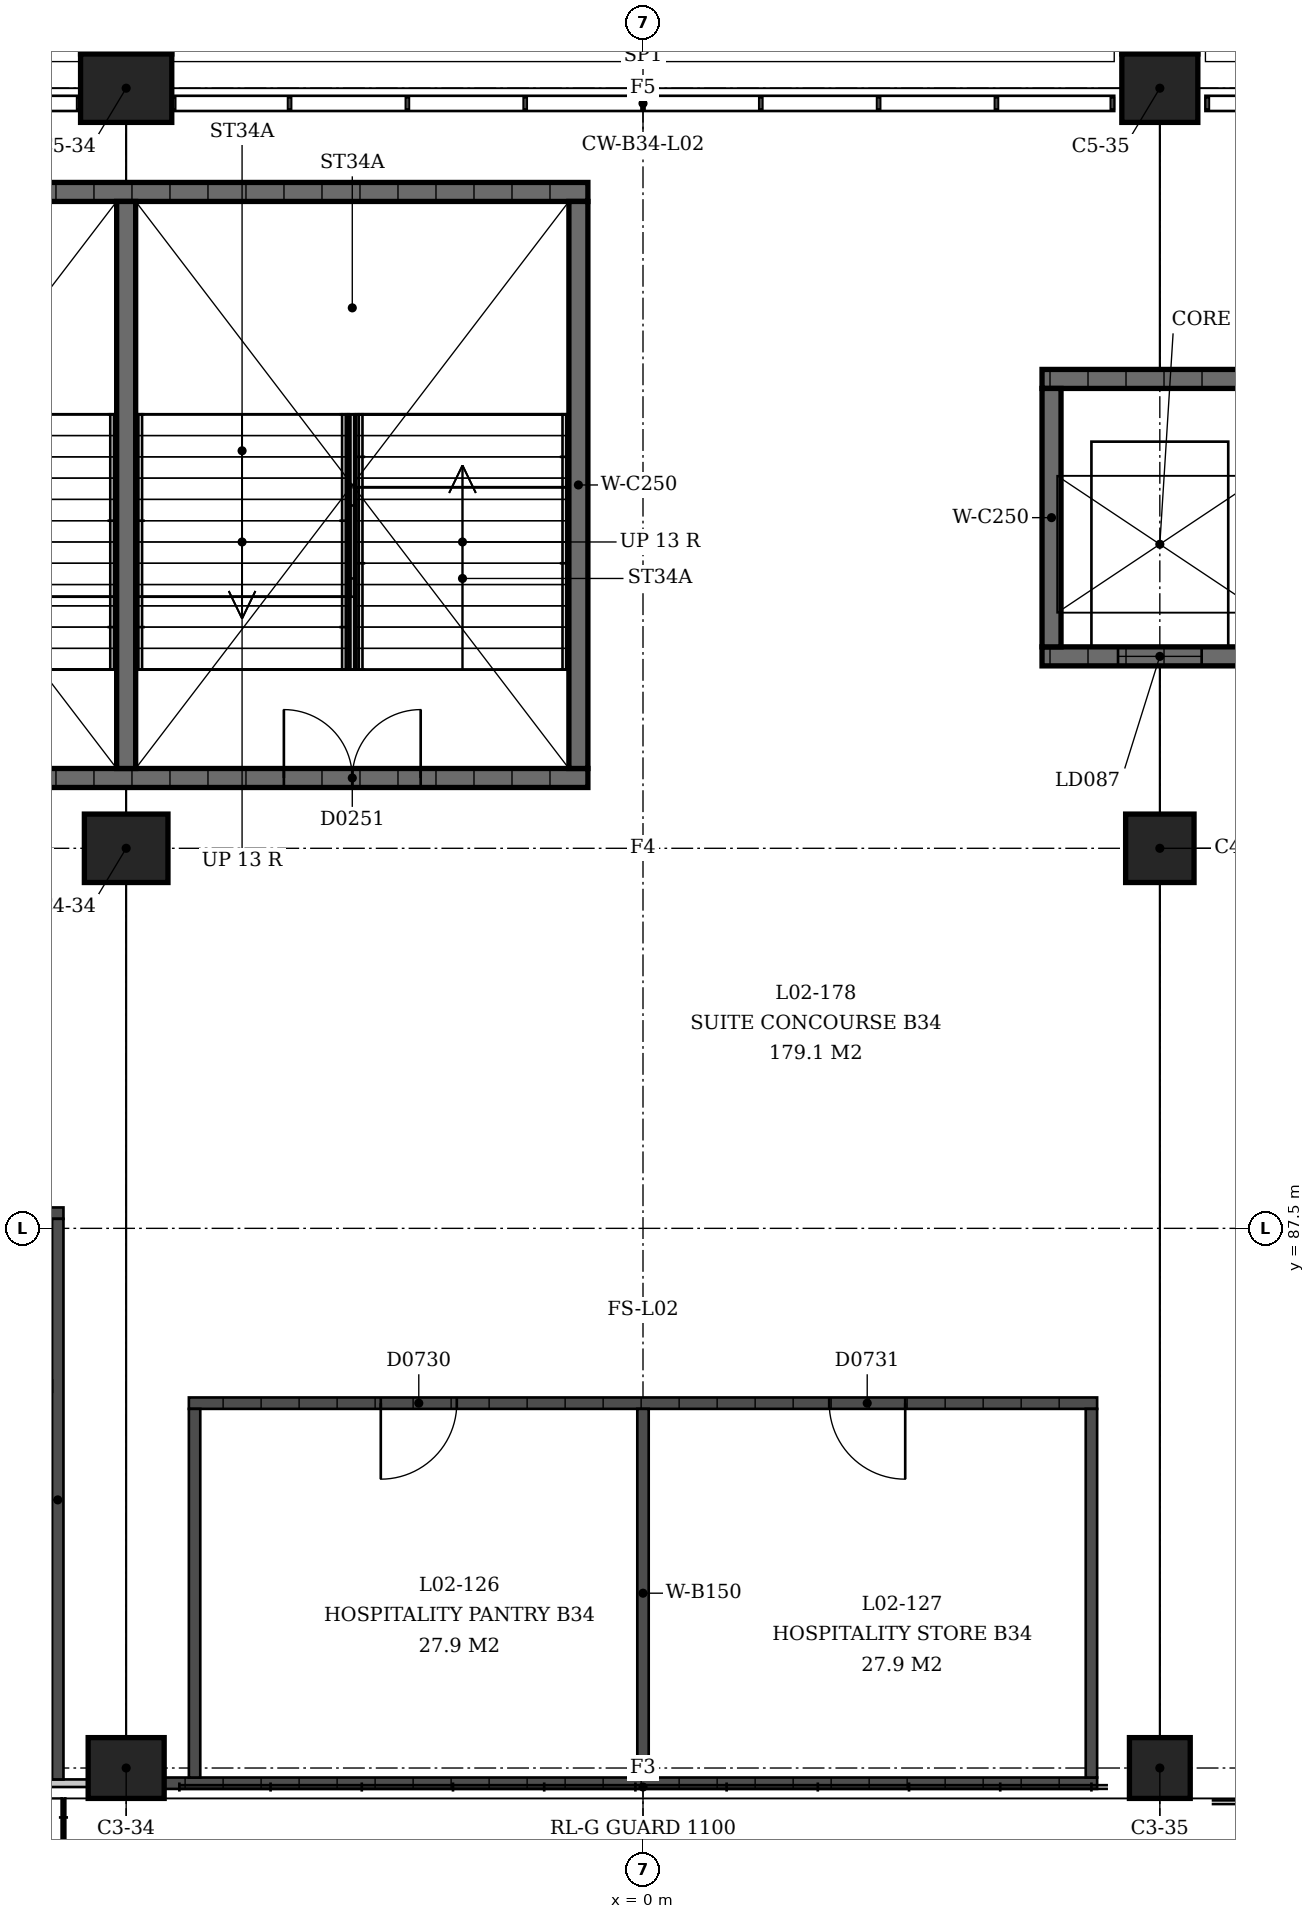
"""IFC4 building model, lengths in metres.
Left out: names, types, materials, properties, quantities, classifications, styles, units other than length and angle.
Written with IfcOpenShell. Run it as: python <this file> out.ifc"""

import sys

from ifc_helpers import new_model, si_unit, direction, frame, frame_2d, origin, origin_2d, place, context, subcontext, project, spatial, rectangle, extrude, element, fill, save


model = new_model("IFC4")
c1 = context("Model", 3, precision=1e-05, world=origin(), true_north=direction((0.0, 1.0)))
c2 = subcontext(c1, "Body", "Model", "MODEL_VIEW")
j1 = project(units=[si_unit("LENGTHUNIT", "METRE"), si_unit("PLANEANGLEUNIT", "RADIAN")], contexts=[c1])
p1 = place(None, origin())
s1 = spatial("IfcSite", under=j1, at=p1, CompositionType="ELEMENT")
p2 = place(p1, origin())
s2 = spatial("IfcBuilding", under=s1, at=p2, CompositionType="ELEMENT")
p3 = place(p2, frame((0.0, 0.0, 9.0)))
s3 = spatial("IfcBuildingStorey", under=s2, at=p3, CompositionType="ELEMENT", Elevation=9.0)
p4 = place(p3, frame((-6.8, 80.4, 0.0), z_axis=(0.0, 0.0, 1.0), x_axis=(-1.0, 0.0, 0.0)))
e1 = element("IfcColumn", 1, at=p4, inside=s3, PredefinedType="COLUMN", context=c2, shape_type="SweptSolid", body=[
    extrude(rectangle(XDim=1.0, YDim=0.8, at=origin_2d()), origin(), (0.0, 0.0, 1.0), 4.5),
])
p5 = place(p3, frame((-6.8, 92.5, 0.0), z_axis=(0.0, 0.0, 1.0), x_axis=(-1.0, 0.0, 0.0)))
e2 = element("IfcColumn", 2, at=p5, inside=s3, PredefinedType="COLUMN", context=c2, shape_type="SweptSolid", body=[
    extrude(rectangle(XDim=1.1, YDim=0.9, at=origin_2d()), origin(), (0.0, 0.0, 1.0), 4.5),
])
p6 = place(p3, frame((-6.8, 102.5, 0.0), z_axis=(0.0, 0.0, 1.0), x_axis=(-1.0, 0.0, 0.0)))
e3 = element("IfcColumn", 3, at=p6, inside=s3, PredefinedType="COLUMN", context=c2, shape_type="SweptSolid", body=[
    extrude(rectangle(XDim=1.2, YDim=0.9, at=origin_2d()), origin(), (0.0, 0.0, 1.0), 4.5),
])
p7 = place(p3, frame((6.8, 80.4, 0.0), z_axis=(0.0, 0.0, 1.0), x_axis=(-1.0, 0.0, 0.0)))
e4 = element("IfcColumn", 4, at=p7, inside=s3, PredefinedType="COLUMN", context=c2, shape_type="SweptSolid", body=[
    extrude(rectangle(XDim=0.8, YDim=0.8, at=origin_2d()), origin(), (0.0, 0.0, 1.0), 4.5),
])
p8 = place(p3, frame((6.8, 92.5, 0.0), z_axis=(0.0, 0.0, 1.0), x_axis=(-1.0, 0.0, 0.0)))
e5 = element("IfcColumn", 5, at=p8, inside=s3, PredefinedType="COLUMN", context=c2, shape_type="SweptSolid", body=[
    extrude(rectangle(XDim=0.9, YDim=0.9, at=origin_2d()), origin(), (0.0, 0.0, 1.0), 4.5),
])
p9 = place(p3, frame((6.8, 102.5, 0.0), z_axis=(0.0, 0.0, 1.0), x_axis=(-1.0, 0.0, 0.0)))
e6 = element("IfcColumn", 6, at=p9, inside=s3, PredefinedType="COLUMN", context=c2, shape_type="SweptSolid", body=[
    extrude(rectangle(XDim=1.0, YDim=0.9, at=origin_2d()), origin(), (0.0, 0.0, 1.0), 4.5),
])
p10 = place(p3, frame((-0.725, 93.425, 0.0), z_axis=(0.0, 0.0, 1.0), x_axis=(-1.0, 0.0, 0.0)))
e7 = element("IfcWall", 7, at=p10, inside=s3, PredefinedType="SHEAR", context=c2, shape_type="SweptSolid", body=[
    extrude(rectangle(XDim=12.15, YDim=0.25, at=frame_2d((6.075, 0.0))), origin(), (0.0, 0.0, 1.0), 4.09),
])
p11 = place(p10, frame((2.2, 0.0, 0.0)))
e8 = element("IfcOpeningElement", 8, at=p11, cuts=e7, PredefinedType="OPENING", context=c2, shape_type="SweptSolid", body=[
    extrude(rectangle(XDim=1.8, YDim=2.1, at=frame_2d((0.9, 1.05))), frame((0.0, 0.125, 0.0), z_axis=(0.0, -1.0, 0.0), x_axis=(1.0, 0.0, 0.0)), (0.0, 0.0, 1.0), 0.25),
])
p12 = place(p10, frame((8.15, 0.0, 0.0)))
e9 = element("IfcOpeningElement", 9, at=p12, cuts=e7, PredefinedType="OPENING", context=c2, shape_type="SweptSolid", body=[
    extrude(rectangle(XDim=1.8, YDim=2.1, at=frame_2d((0.9, 1.05))), frame((0.0, 0.125, 0.0), z_axis=(0.0, -1.0, 0.0), x_axis=(1.0, 0.0, 0.0)), (0.0, 0.0, 1.0), 0.25),
])
p13 = place(p3, frame((-0.725, 101.135, 0.0), z_axis=(0.0, 0.0, 1.0), x_axis=(-1.0, 0.0, 0.0)))
e10 = element("IfcWall", 10, at=p13, inside=s3, PredefinedType="SHEAR", context=c2, shape_type="SweptSolid", body=[
    extrude(rectangle(XDim=12.15, YDim=0.25, at=frame_2d((6.075, 0.0))), origin(), (0.0, 0.0, 1.0), 4.09),
])
for number, where, z_axis, x_axis in (
    (11, (-0.85, 93.55, 0.0), (0.0, 0.0, 1.0), (0.0, 1.0, 0.0)),
    (12, (-6.8, 93.55, 0.0), (0.0, 0.0, 1.0), (0.0, 1.0, 0.0)),
):
    element("IfcWall", number, at=place(p3, frame(where, z_axis=z_axis, x_axis=x_axis)), inside=s3, PredefinedType="SHEAR", context=c2, shape_type="SweptSolid", body=[
        extrude(rectangle(XDim=7.46, YDim=0.25, at=frame_2d((3.73, 0.0))), origin(), (0.0, 0.0, 1.0), 4.09),
    ])
p14 = place(p3, frame((8.35, 95.025, 0.0), z_axis=(0.0, 0.0, 1.0), x_axis=(-1.0, 0.0, 0.0)))
e13 = element("IfcWall", 13, at=p14, inside=s3, PredefinedType="SHEAR", context=c2, shape_type="SweptSolid", body=[
    extrude(rectangle(XDim=3.1, YDim=0.25, at=frame_2d((1.55, 0.0))), origin(), (0.0, 0.0, 1.0), 4.09),
])
p15 = place(p14, frame((1.0, 0.0, 0.0)))
e14 = element("IfcOpeningElement", 14, at=p15, cuts=e13, PredefinedType="OPENING", context=c2, shape_type="SweptSolid", body=[
    extrude(rectangle(XDim=1.1, YDim=2.1, at=frame_2d((0.55, 1.05))), frame((0.0, 0.125, 0.0), z_axis=(0.0, -1.0, 0.0), x_axis=(1.0, 0.0, 0.0)), (0.0, 0.0, 1.0), 0.25),
])
p16 = place(p3, frame((8.35, 98.675, 0.0), z_axis=(0.0, 0.0, 1.0), x_axis=(-1.0, 0.0, 0.0)))
e15 = element("IfcWall", 15, at=p16, inside=s3, PredefinedType="SHEAR", context=c2, shape_type="SweptSolid", body=[
    extrude(rectangle(XDim=3.1, YDim=0.25, at=frame_2d((1.55, 0.0))), origin(), (0.0, 0.0, 1.0), 4.09),
])
p17 = place(p3, frame((5.375, 95.15, 0.0), z_axis=(0.0, 0.0, 1.0), x_axis=(0.0, 1.0, 0.0)))
e16 = element("IfcWall", 16, at=p17, inside=s3, PredefinedType="SHEAR", context=c2, shape_type="SweptSolid", body=[
    extrude(rectangle(XDim=3.4, YDim=0.25, at=frame_2d((1.7, 0.0))), origin(), (0.0, 0.0, 1.0), 4.09),
])
p18 = place(p3, frame((-7.3, 80.2, 0.0), z_axis=(0.0, 0.0, 1.0), x_axis=(-1.0, 0.0, 0.0)))
e17 = element("IfcWall", 17, at=p18, inside=s3, PredefinedType="PARTITIONING", context=c2, shape_type="SweptSolid", body=[
    extrude(rectangle(XDim=6.475, YDim=0.1, at=frame_2d((3.237, 0.0))), origin(), (0.0, 0.0, 1.0), 3.0),
])
p19 = place(p18, frame((2.5, 0.0, 0.0)))
e18 = element("IfcOpeningElement", 18, at=p19, cuts=e17, PredefinedType="OPENING", context=c2, shape_type="SweptSolid", body=[
    extrude(rectangle(XDim=1.8, YDim=2.1, at=frame_2d((0.9, 1.05))), frame((0.0, 0.05, 0.0), z_axis=(0.0, -1.0, 0.0), x_axis=(1.0, 0.0, 0.0)), (0.0, 0.0, 1.0), 0.1),
])
p20 = place(p3, frame((-7.625, 87.7, 0.0), z_axis=(0.0, 0.0, 1.0), x_axis=(-1.0, 0.0, 0.0)))
e19 = element("IfcWall", 19, at=p20, inside=s3, PredefinedType="SOLIDWALL", context=c2, shape_type="SweptSolid", body=[
    extrude(rectangle(XDim=6.15, YDim=0.15, at=frame_2d((3.075, 0.0))), origin(), (0.0, 0.0, 1.0), 3.0),
])
p21 = place(p20, frame((3.862, 0.0, 0.0)))
e20 = element("IfcOpeningElement", 20, at=p21, cuts=e19, PredefinedType="OPENING", context=c2, shape_type="SweptSolid", body=[
    extrude(rectangle(XDim=1.0, YDim=2.1, at=frame_2d((0.5, 1.05))), frame((0.0, 0.075, 0.0), z_axis=(0.0, -1.0, 0.0), x_axis=(1.0, 0.0, 0.0)), (0.0, 0.0, 1.0), 0.15),
])
p22 = place(p3, frame((-7.7, 80.25, 0.0), z_axis=(0.0, 0.0, 1.0), x_axis=(0.0, 1.0, 0.0)))
e21 = element("IfcWall", 21, at=p22, inside=s3, PredefinedType="SOLIDWALL", context=c2, shape_type="SweptSolid", body=[
    extrude(rectangle(XDim=7.375, YDim=0.15, at=frame_2d((3.688, 0.0))), origin(), (0.0, 0.0, 1.0), 3.0),
])
p23 = place(p3, frame((-7.775, 85.425, 0.0), z_axis=(0.0, 0.0, 1.0), x_axis=(-1.0, 0.0, 0.0)))
e22 = element("IfcWall", 22, at=p23, inside=s3, PredefinedType="PARTITIONING", context=c2, shape_type="SweptSolid", body=[
    extrude(rectangle(XDim=1.775, YDim=0.15, at=frame_2d((0.888, 0.0))), origin(), (0.0, 0.0, 1.0), 3.0),
])
p24 = place(p23, frame((0.363, 0.0, 0.0)))
e23 = element("IfcOpeningElement", 23, at=p24, cuts=e22, PredefinedType="OPENING", context=c2, shape_type="SweptSolid", body=[
    extrude(rectangle(XDim=0.9, YDim=2.1, at=frame_2d((0.45, 1.05))), frame((0.0, 0.075, 0.0), z_axis=(0.0, -1.0, 0.0), x_axis=(1.0, 0.0, 0.0)), (0.0, 0.0, 1.0), 0.15),
])
p25 = place(p3, frame((-6.3, 80.2, 0.0), z_axis=(0.0, 0.0, 1.0), x_axis=(1.0, 0.0, 0.0)))
e24 = element("IfcWall", 24, at=p25, inside=s3, PredefinedType="SOLIDWALL", context=c2, shape_type="SweptSolid", body=[
    extrude(rectangle(XDim=12.275, YDim=0.15, at=frame_2d((6.138, 0.0))), origin(), (0.0, 0.0, 1.0), 3.0),
])
p26 = place(p3, frame((-5.975, 85.2, 0.0), z_axis=(0.0, 0.0, 1.0), x_axis=(1.0, 0.0, 0.0)))
e25 = element("IfcWall", 25, at=p26, inside=s3, PredefinedType="SOLIDWALL", context=c2, shape_type="SweptSolid", body=[
    extrude(rectangle(XDim=11.95, YDim=0.15, at=frame_2d((5.975, 0.0))), origin(), (0.0, 0.0, 1.0), 3.0),
])
p27 = place(p26, frame((2.525, 0.0, 0.0)))
e26 = element("IfcOpeningElement", 26, at=p27, cuts=e25, PredefinedType="OPENING", context=c2, shape_type="SweptSolid", body=[
    extrude(rectangle(XDim=1.0, YDim=2.1, at=frame_2d((0.5, 1.05))), frame((0.0, 0.075, 0.0), z_axis=(0.0, -1.0, 0.0), x_axis=(1.0, 0.0, 0.0)), (0.0, 0.0, 1.0), 0.15),
])
p28 = place(p26, frame((8.425, 0.0, 0.0)))
e27 = element("IfcOpeningElement", 27, at=p28, cuts=e25, PredefinedType="OPENING", context=c2, shape_type="SweptSolid", body=[
    extrude(rectangle(XDim=1.0, YDim=2.1, at=frame_2d((0.5, 1.05))), frame((0.0, 0.075, 0.0), z_axis=(0.0, -1.0, 0.0), x_axis=(1.0, 0.0, 0.0)), (0.0, 0.0, 1.0), 0.15),
])
for number, where, z_axis, x_axis in (
    (28, (-5.9, 80.275, 0.0), (0.0, 0.0, 1.0), (0.0, 1.0, 0.0)),
    (29, (0.0, 80.275, 0.0), (0.0, 0.0, 1.0), (0.0, 1.0, 0.0)),
    (30, (5.9, 80.275, 0.0), (0.0, 0.0, 1.0), (0.0, 1.0, 0.0)),
):
    element("IfcWall", number, at=place(p3, frame(where, z_axis=z_axis, x_axis=x_axis)), inside=s3, PredefinedType="SOLIDWALL", context=c2, shape_type="SweptSolid", body=[
        extrude(rectangle(XDim=4.85, YDim=0.15, at=frame_2d((2.425, 0.0))), origin(), (0.0, 0.0, 1.0), 3.0),
    ])
p29 = place(p11, origin())
e31 = element("IfcDoor", 31, at=p29, inside=s3, OperationType="DOUBLE_DOOR_SINGLE_SWING", PredefinedType="DOOR", context=c2, shape_type="SweptSolid", body=[
    extrude(rectangle(XDim=1.8, YDim=2.1, at=frame_2d((0.9, 1.05))), frame((0.0, 0.025, 0.0), z_axis=(0.0, -1.0, 0.0), x_axis=(1.0, 0.0, 0.0)), (0.0, 0.0, 1.0), 0.05),
])
fill(e8, e31)
p30 = place(p15, origin())
e32 = element("IfcDoor", 32, at=p30, inside=s3, OperationType="SLIDING_TO_LEFT", PredefinedType="DOOR", context=c2, shape_type="SweptSolid", body=[
    extrude(rectangle(XDim=1.1, YDim=2.1, at=frame_2d((0.55, 1.05))), frame((0.0, 0.025, 0.0), z_axis=(0.0, -1.0, 0.0), x_axis=(1.0, 0.0, 0.0)), (0.0, 0.0, 1.0), 0.05),
])
fill(e14, e32)
p31 = place(p27, origin())
e33 = element("IfcDoor", 33, at=p31, inside=s3, OperationType="SINGLE_SWING_LEFT", PredefinedType="DOOR", context=c2, shape_type="SweptSolid", body=[
    extrude(rectangle(XDim=1.0, YDim=2.1, at=frame_2d((0.5, 1.05))), frame((0.0, 0.025, 0.0), z_axis=(0.0, -1.0, 0.0), x_axis=(1.0, 0.0, 0.0)), (0.0, 0.0, 1.0), 0.05),
])
fill(e26, e33)
p32 = place(p28, origin())
e34 = element("IfcDoor", 34, at=p32, inside=s3, OperationType="SINGLE_SWING_RIGHT", PredefinedType="DOOR", context=c2, shape_type="SweptSolid", body=[
    extrude(rectangle(XDim=1.0, YDim=2.1, at=frame_2d((0.5, 1.05))), frame((0.0, 0.025, 0.0), z_axis=(0.0, -1.0, 0.0), x_axis=(1.0, 0.0, 0.0)), (0.0, 0.0, 1.0), 0.05),
])
fill(e27, e34)
save(model, sys.argv[1])
